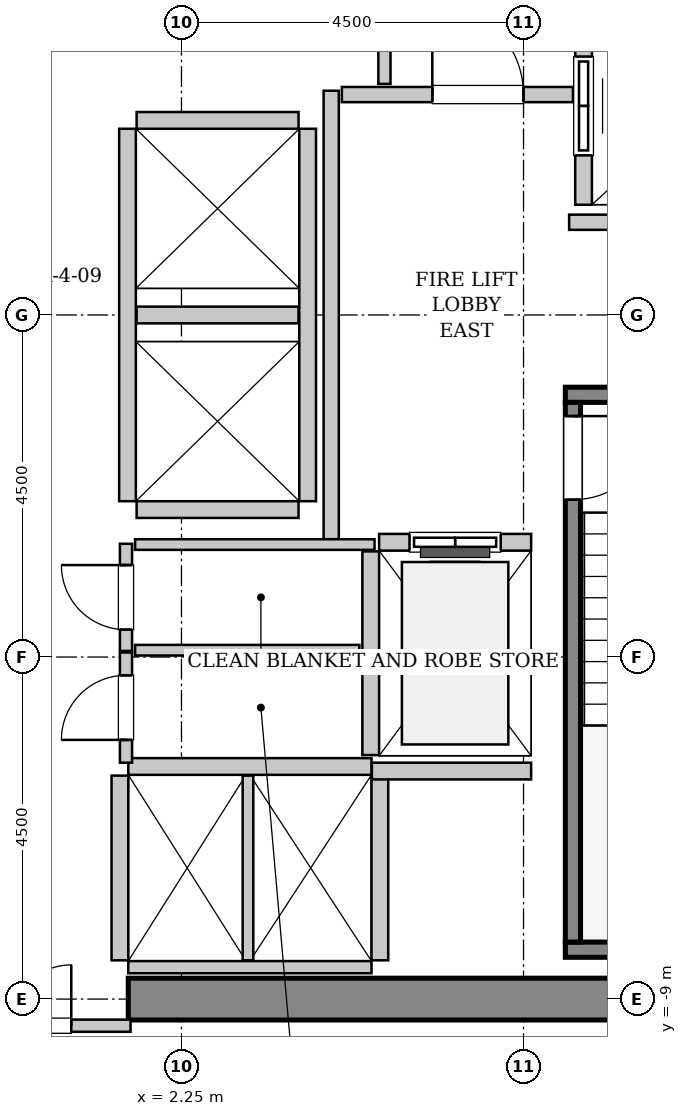
"""IFC4 building model, lengths in metres.
Left out: names, types, materials, properties, quantities, classifications, styles, units other than length and angle.
Written with IfcOpenShell. Run it as: python <this file> out.ifc"""

import sys

from ifc_helpers import new_model, si_unit, direction, frame, frame_2d, origin, place, context, subcontext, project, spatial, rectangle, extrude, source, transform, mapped, element, fill, save


model = new_model("IFC4")
c1 = context("Model", 3, precision=1e-05, world=origin(), true_north=direction((0.0, 1.0)))
c2 = subcontext(c1, "Body", "Model", "MODEL_VIEW")
j1 = project(units=[si_unit("LENGTHUNIT", "METRE"), si_unit("PLANEANGLEUNIT", "RADIAN")], contexts=[c1])
p1 = place(None, origin())
s1 = spatial("IfcSite", under=j1, at=p1, CompositionType="ELEMENT")
p2 = place(p1, origin())
s2 = spatial("IfcBuilding", under=s1, at=p2, CompositionType="ELEMENT")
p3 = place(p2, frame((0.0, 0.0, 140.2)))
s3 = spatial("IfcBuildingStorey", under=s2, at=p3, CompositionType="ELEMENT", Elevation=140.2)
m1 = source(origin(), c2, "Body", "SweptSolid", [
    extrude(rectangle(XDim=9.975, YDim=0.55, at=frame_2d((4.987, 0.0))), origin(), (0.0, 0.0, 1.0), 3.8),
])
p4 = place(p3, frame((1.55, -9.0, 0.0), z_axis=(0.0, 0.0, 1.0), x_axis=(1.0, 0.0, 0.0)))
e1 = element("IfcWall", 1, at=p4, inside=s3, PredefinedType="SHEAR", context=c2, shape_type="MappedRepresentation", body=[
    mapped(m1, transform((0.0, 0.0, 0.0), x_axis=(1.0, 0.0, 0.0), y_axis=(0.0, 1.0, 0.0), z_axis=(0.0, 0.0, 1.0), scale=1.0)),
])
m2 = source(origin(), c2, "Body", "SweptSolid", [
    extrude(rectangle(XDim=3.4, YDim=0.2, at=frame_2d((1.7, 0.0))), origin(), (0.0, 0.0, 1.0), 3.8),
])
p5 = place(p3, frame((7.3, -1.05, 0.0), z_axis=(0.0, 0.0, 1.0), x_axis=(1.0, 0.0, 0.0)))
e2 = element("IfcWall", 2, at=p5, inside=s3, PredefinedType="SOLIDWALL", context=c2, shape_type="MappedRepresentation", body=[
    mapped(m2, transform((0.0, 0.0, 0.0), x_axis=(1.0, 0.0, 0.0), y_axis=(0.0, 1.0, 0.0), z_axis=(0.0, 0.0, 1.0), scale=1.0)),
])
m3 = source(origin(), c2, "Body", "SweptSolid", [
    extrude(rectangle(XDim=3.68, YDim=0.2, at=frame_2d((1.84, 0.0))), origin(), (0.0, 0.0, 1.0), 3.8),
])
p6 = place(p3, frame((7.3, -8.35, 0.0), z_axis=(0.0, 0.0, 1.0), x_axis=(1.0, 0.0, 0.0)))
e3 = element("IfcWall", 3, at=p6, inside=s3, PredefinedType="SOLIDWALL", context=c2, shape_type="MappedRepresentation", body=[
    mapped(m3, transform((0.0, 0.0, 0.0), x_axis=(1.0, 0.0, 0.0), y_axis=(0.0, 1.0, 0.0), z_axis=(0.0, 0.0, 1.0), scale=1.0)),
])
m4 = source(origin(), c2, "Body", "SweptSolid", [
    extrude(rectangle(XDim=7.1, YDim=0.2, at=frame_2d((3.55, 0.0))), origin(), (0.0, 0.0, 1.0), 3.8),
])
p7 = place(p3, frame((7.4, -1.15, 0.0), z_axis=(0.0, 0.0, 1.0), x_axis=(0.0, -1.0, 0.0)))
e4 = element("IfcWall", 4, at=p7, inside=s3, PredefinedType="SOLIDWALL", context=c2, shape_type="MappedRepresentation", body=[
    mapped(m4, transform((0.0, 0.0, 0.0), x_axis=(1.0, 0.0, 0.0), y_axis=(0.0, 1.0, 0.0), z_axis=(0.0, 0.0, 1.0), scale=1.0)),
])
p8 = place(p7, frame((0.18, 0.0, 0.0)))
e5 = element("IfcOpeningElement", 5, at=p8, cuts=e4, PredefinedType="OPENING", context=c2, shape_type="SweptSolid", body=[
    extrude(rectangle(XDim=1.1, YDim=2.15, at=frame_2d((0.55, 1.075))), frame((0.0, 0.11, 0.0), z_axis=(0.0, -1.0, 0.0), x_axis=(1.0, 0.0, 0.0)), (0.0, 0.0, 1.0), 0.22),
])
m5 = source(origin(), c2, "Body", "SweptSolid", [
    extrude(rectangle(XDim=2.0, YDim=0.22, at=frame_2d((1.0, 0.0))), origin(), (0.0, 0.0, 1.0), 3.485),
])
p9 = place(p3, frame((6.85, -2.99, 0.0), z_axis=(0.0, 0.0, 1.0), x_axis=(-1.0, 0.0, 0.0)))
e6 = element("IfcWall", 6, at=p9, inside=s3, PredefinedType="SOLIDWALL", context=c2, shape_type="MappedRepresentation", body=[
    mapped(m5, transform((0.0, 0.0, 0.0), x_axis=(1.0, 0.0, 0.0), y_axis=(0.0, 1.0, 0.0), z_axis=(0.0, 0.0, 1.0), scale=1.0)),
])
p10 = place(p9, frame((0.4, 0.0, 0.0)))
e7 = element("IfcOpeningElement", 7, at=p10, cuts=e6, PredefinedType="OPENING", context=c2, shape_type="SweptSolid", body=[
    extrude(rectangle(XDim=1.2, YDim=2.2, at=frame_2d((0.6, 1.1))), frame((0.0, 0.12, 0.0), z_axis=(0.0, -1.0, 0.0), x_axis=(1.0, 0.0, 0.0)), (0.0, 0.0, 1.0), 0.24),
])
m6 = source(origin(), c2, "Body", "SweptSolid", [
    extrude(rectangle(XDim=2.68, YDim=0.22, at=frame_2d((1.34, 0.0))), origin(), (0.0, 0.0, 1.0), 3.485),
])
p11 = place(p3, frame((4.74, -3.11, 0.0), z_axis=(0.0, 0.0, 1.0), x_axis=(0.0, -1.0, 0.0)))
e8 = element("IfcWall", 8, at=p11, inside=s3, PredefinedType="SOLIDWALL", context=c2, shape_type="MappedRepresentation", body=[
    mapped(m6, transform((0.0, 0.0, 0.0), x_axis=(1.0, 0.0, 0.0), y_axis=(0.0, 1.0, 0.0), z_axis=(0.0, 0.0, 1.0), scale=1.0)),
])
m7 = source(origin(), c2, "Body", "SweptSolid", [
    extrude(rectangle(XDim=5.45, YDim=0.22, at=frame_2d((2.725, 0.0))), origin(), (0.0, 0.0, 1.0), 3.485),
])
p12 = place(p3, frame((7.54, 6.9, 0.0), z_axis=(0.0, 0.0, 1.0), x_axis=(0.0, -1.0, 0.0)))
e9 = element("IfcWall", 9, at=p12, inside=s3, PredefinedType="SOLIDWALL", context=c2, shape_type="MappedRepresentation", body=[
    mapped(m7, transform((0.0, 0.0, 0.0), x_axis=(1.0, 0.0, 0.0), y_axis=(0.0, 1.0, 0.0), z_axis=(0.0, 0.0, 1.0), scale=1.0)),
])
p13 = place(p12, frame((3.5, 0.0, 0.0)))
e10 = element("IfcOpeningElement", 10, at=p13, cuts=e9, PredefinedType="OPENING", context=c2, shape_type="SweptSolid", body=[
    extrude(rectangle(XDim=1.3, YDim=2.3, at=frame_2d((0.65, 1.15))), frame((0.0, 0.12, 0.0), z_axis=(0.0, -1.0, 0.0), x_axis=(1.0, 0.0, 0.0)), (0.0, 0.0, 1.0), 0.24),
])
p14 = place(p12, frame((0.65, 0.0, 0.0)))
e11 = element("IfcOpeningElement", 11, at=p14, cuts=e9, PredefinedType="OPENING", context=c2, shape_type="SweptSolid", body=[
    extrude(rectangle(XDim=1.3, YDim=2.3, at=frame_2d((0.65, 1.15))), frame((0.0, 0.12, 0.0), z_axis=(0.0, -1.0, 0.0), x_axis=(1.0, 0.0, 0.0)), (0.0, 0.0, 1.0), 0.24),
])
m8 = source(origin(), c2, "Body", "SweptSolid", [
    extrude(rectangle(XDim=3.2, YDim=0.22, at=frame_2d((1.6, 0.0))), origin(), (0.0, 0.0, 1.0), 3.485),
])
p15 = place(p3, frame((4.75, -5.94, 0.0), z_axis=(0.0, 0.0, 1.0), x_axis=(-1.0, 0.0, 0.0)))
e12 = element("IfcWall", 12, at=p15, inside=s3, PredefinedType="SOLIDWALL", context=c2, shape_type="MappedRepresentation", body=[
    mapped(m8, transform((0.0, 0.0, 0.0), x_axis=(1.0, 0.0, 0.0), y_axis=(0.0, 1.0, 0.0), z_axis=(0.0, 0.0, 1.0), scale=1.0)),
])
m9 = source(origin(), c2, "Body", "SweptSolid", [
    extrude(rectangle(XDim=3.2, YDim=0.16, at=frame_2d((1.6, 0.0))), origin(), (0.0, 0.0, 1.0), 2.375),
])
p16 = place(p3, frame((1.55, -8.58, 0.0), z_axis=(0.0, 0.0, 1.0), x_axis=(1.0, 0.0, 0.0)))
e13 = element("IfcWall", 13, at=p16, inside=s3, PredefinedType="PARTITIONING", context=c2, shape_type="MappedRepresentation", body=[
    mapped(m9, transform((0.0, 0.0, 0.0), x_axis=(1.0, 0.0, 0.0), y_axis=(0.0, 1.0, 0.0), z_axis=(0.0, 0.0, 1.0), scale=1.0)),
])
m10 = source(origin(), c2, "Body", "SweptSolid", [
    extrude(rectangle(XDim=2.43, YDim=0.22, at=frame_2d((1.215, 0.0))), origin(), (0.0, 0.0, 1.0), 3.485),
])
p17 = place(p3, frame((1.44, -6.06, 0.0), z_axis=(0.0, 0.0, 1.0), x_axis=(0.0, -1.0, 0.0)))
e14 = element("IfcWall", 14, at=p17, inside=s3, PredefinedType="SOLIDWALL", context=c2, shape_type="MappedRepresentation", body=[
    mapped(m10, transform((0.0, 0.0, 0.0), x_axis=(1.0, 0.0, 0.0), y_axis=(0.0, 1.0, 0.0), z_axis=(0.0, 0.0, 1.0), scale=1.0)),
])
m11 = source(origin(), c2, "Body", "SweptSolid", [
    extrude(rectangle(XDim=2.43, YDim=0.14, at=frame_2d((1.215, 0.0))), origin(), (0.0, 0.0, 1.0), 3.485),
])
p18 = place(p3, frame((3.125, -8.49, 0.0), z_axis=(0.0, 0.0, 1.0), x_axis=(0.0, 1.0, 0.0)))
e15 = element("IfcWall", 15, at=p18, inside=s3, PredefinedType="PARTITIONING", context=c2, shape_type="MappedRepresentation", body=[
    mapped(m11, transform((0.0, 0.0, 0.0), x_axis=(1.0, 0.0, 0.0), y_axis=(0.0, 1.0, 0.0), z_axis=(0.0, 0.0, 1.0), scale=1.0)),
])
p19 = place(p3, frame((4.86, -8.49, 0.0), z_axis=(0.0, 0.0, 1.0), x_axis=(0.0, 1.0, 0.0)))
e16 = element("IfcWall", 16, at=p19, inside=s3, PredefinedType="SOLIDWALL", context=c2, shape_type="MappedRepresentation", body=[
    mapped(m10, transform((0.0, 0.0, 0.0), x_axis=(1.0, 0.0, 0.0), y_axis=(0.0, 1.0, 0.0), z_axis=(0.0, 0.0, 1.0), scale=1.0)),
])
m12 = source(origin(), c2, "Body", "SweptSolid", [
    extrude(rectangle(XDim=4.9, YDim=0.22, at=frame_2d((2.45, 0.0))), origin(), (0.0, 0.0, 1.0), 3.485),
])
for number, where, z_axis, x_axis in (
    (17, (1.54, 2.45, 0.0), (0.0, 0.0, 1.0), (0.0, -1.0, 0.0)),
    (18, (3.91, -2.45, 0.0), (0.0, 0.0, 1.0), (0.0, 1.0, 0.0)),
):
    element("IfcWall", number, at=place(p3, frame(where, z_axis=z_axis, x_axis=x_axis)), inside=s3, PredefinedType="SOLIDWALL", context=c2, shape_type="MappedRepresentation", body=[
        mapped(m12, transform((0.0, 0.0, 0.0), x_axis=(1.0, 0.0, 0.0), y_axis=(0.0, 1.0, 0.0), z_axis=(0.0, 0.0, 1.0), scale=1.0)),
    ])
m13 = source(origin(), c2, "Body", "SweptSolid", [
    extrude(rectangle(XDim=2.13, YDim=0.22, at=frame_2d((1.065, 0.0))), origin(), (0.0, 0.0, 1.0), 3.485),
])
for number, where, z_axis, x_axis in (
    (19, (1.66, -2.56, 0.0), (0.0, 0.0, 1.0), (1.0, 0.0, 0.0)),
    (20, (1.66, 0.0, 0.0), (0.0, 0.0, 1.0), (1.0, 0.0, 0.0)),
    (21, (3.79, 2.56, 0.0), (0.0, 0.0, 1.0), (-1.0, 0.0, 0.0)),
):
    element("IfcWall", number, at=place(p3, frame(where, z_axis=z_axis, x_axis=x_axis)), inside=s3, PredefinedType="SOLIDWALL", context=c2, shape_type="MappedRepresentation", body=[
        mapped(m13, transform((0.0, 0.0, 0.0), x_axis=(1.0, 0.0, 0.0), y_axis=(0.0, 1.0, 0.0), z_axis=(0.0, 0.0, 1.0), scale=1.0)),
    ])
m14 = source(origin(), c2, "Body", "SweptSolid", [
    extrude(rectangle(XDim=2.095, YDim=0.22, at=frame_2d((1.048, 0.0))), origin(), (0.0, 0.0, 1.0), 3.485),
])
p20 = place(p3, frame((4.755, -6.0, 0.0), z_axis=(0.0, 0.0, 1.0), x_axis=(1.0, 0.0, 0.0)))
e22 = element("IfcWall", 22, at=p20, inside=s3, PredefinedType="SOLIDWALL", context=c2, shape_type="MappedRepresentation", body=[
    mapped(m14, transform((0.0, 0.0, 0.0), x_axis=(1.0, 0.0, 0.0), y_axis=(0.0, 1.0, 0.0), z_axis=(0.0, 0.0, 1.0), scale=1.0)),
])
m15 = source(origin(), c2, "Body", "SweptSolid", [
    extrude(rectangle(XDim=5.9, YDim=0.2, at=frame_2d((2.95, 0.0))), origin(), (0.0, 0.0, 1.0), 3.485),
])
p21 = place(p3, frame((4.22, -2.95, 0.0), z_axis=(0.0, 0.0, 1.0), x_axis=(0.0, 1.0, 0.0)))
e23 = element("IfcWall", 23, at=p21, inside=s3, PredefinedType="PARTITIONING", context=c2, shape_type="MappedRepresentation", body=[
    mapped(m15, transform((0.0, 0.0, 0.0), x_axis=(1.0, 0.0, 0.0), y_axis=(0.0, 1.0, 0.0), z_axis=(0.0, 0.0, 1.0), scale=1.0)),
])
m16 = source(origin(), c2, "Body", "SweptSolid", [
    extrude(rectangle(XDim=3.04, YDim=0.2, at=frame_2d((1.52, 0.0))), origin(), (0.0, 0.0, 1.0), 3.485),
])
p22 = place(p3, frame((4.36, 2.9, 0.0), z_axis=(0.0, 0.0, 1.0), x_axis=(1.0, 0.0, 0.0)))
e24 = element("IfcWall", 24, at=p22, inside=s3, PredefinedType="PARTITIONING", context=c2, shape_type="MappedRepresentation", body=[
    mapped(m16, transform((0.0, 0.0, 0.0), x_axis=(1.0, 0.0, 0.0), y_axis=(0.0, 1.0, 0.0), z_axis=(0.0, 0.0, 1.0), scale=1.0)),
])
p23 = place(p22, frame((1.19, 0.0, 0.0)))
e25 = element("IfcOpeningElement", 25, at=p23, cuts=e24, PredefinedType="OPENING", context=c2, shape_type="SweptSolid", body=[
    extrude(rectangle(XDim=1.2, YDim=2.15, at=frame_2d((0.6, 1.075))), frame((0.0, 0.11, 0.0), z_axis=(0.0, -1.0, 0.0), x_axis=(1.0, 0.0, 0.0)), (0.0, 0.0, 1.0), 0.22),
])
m17 = source(origin(), c2, "Body", "SweptSolid", [
    extrude(rectangle(XDim=4.11, YDim=0.2, at=frame_2d((2.055, 0.0))), origin(), (0.0, 0.0, 1.0), 3.485),
])
p24 = place(p3, frame((7.35, 1.22, 0.0), z_axis=(0.0, 0.0, 1.0), x_axis=(1.0, 0.0, 0.0)))
e26 = element("IfcWall", 26, at=p24, inside=s3, PredefinedType="PARTITIONING", context=c2, shape_type="MappedRepresentation", body=[
    mapped(m17, transform((0.0, 0.0, 0.0), x_axis=(1.0, 0.0, 0.0), y_axis=(0.0, 1.0, 0.0), z_axis=(0.0, 0.0, 1.0), scale=1.0)),
])
m18 = source(origin(), c2, "Body", "SweptSolid", [
    extrude(rectangle(XDim=3.16, YDim=0.16, at=frame_2d((1.58, 0.0))), origin(), (0.0, 0.0, 1.0), 2.375),
])
p25 = place(p3, frame((-1.58, -9.35, 0.0), z_axis=(0.0, 0.0, 1.0), x_axis=(1.0, 0.0, 0.0)))
e27 = element("IfcWall", 27, at=p25, inside=s3, PredefinedType="PARTITIONING", context=c2, shape_type="MappedRepresentation", body=[
    mapped(m18, transform((0.0, 0.0, 0.0), x_axis=(1.0, 0.0, 0.0), y_axis=(0.0, 1.0, 0.0), z_axis=(0.0, 0.0, 1.0), scale=1.0)),
])
p26 = place(p25, frame((0.78, 0.0, 0.0)))
e28 = element("IfcOpeningElement", 28, at=p26, cuts=e27, PredefinedType="OPENING", context=c2, shape_type="SweptSolid", body=[
    extrude(rectangle(XDim=1.6, YDim=2.3, at=frame_2d((0.8, 1.15))), frame((0.0, 0.09, 0.0), z_axis=(0.0, -1.0, 0.0), x_axis=(1.0, 0.0, 0.0)), (0.0, 0.0, 1.0), 0.18),
])
m19 = source(origin(), c2, "Body", "SweptSolid", [
    extrude(rectangle(XDim=3.015, YDim=0.16, at=frame_2d((1.507, 0.0))), origin(), (0.0, 0.0, 1.0), 3.485),
])
p27 = place(p3, frame((4.92, 3.04, 0.0), z_axis=(0.0, 0.0, 1.0), x_axis=(0.0, 1.0, 0.0)))
e29 = element("IfcWall", 29, at=p27, inside=s3, PredefinedType="PARTITIONING", context=c2, shape_type="MappedRepresentation", body=[
    mapped(m19, transform((0.0, 0.0, 0.0), x_axis=(1.0, 0.0, 0.0), y_axis=(0.0, 1.0, 0.0), z_axis=(0.0, 0.0, 1.0), scale=1.0)),
])
m20 = source(origin(), c2, "Body", "SweptSolid", [
    extrude(rectangle(XDim=1.41, YDim=0.16, at=frame_2d((0.705, 0.0))), origin(), (0.0, 0.0, 1.0), 3.485),
])
p28 = place(p3, frame((1.52, -4.42, 0.0), z_axis=(0.0, 0.0, 1.0), x_axis=(0.0, 1.0, 0.0)))
e30 = element("IfcWall", 30, at=p28, inside=s3, PredefinedType="PARTITIONING", context=c2, shape_type="MappedRepresentation", body=[
    mapped(m20, transform((0.0, 0.0, 0.0), x_axis=(1.0, 0.0, 0.0), y_axis=(0.0, 1.0, 0.0), z_axis=(0.0, 0.0, 1.0), scale=1.0)),
])
p29 = place(p28, frame((0.28, 0.0, 0.0)))
e31 = element("IfcOpeningElement", 31, at=p29, cuts=e30, PredefinedType="OPENING", context=c2, shape_type="SweptSolid", body=[
    extrude(rectangle(XDim=0.85, YDim=2.1, at=frame_2d((0.425, 1.05))), frame((0.0, 0.09, 0.0), z_axis=(0.0, -1.0, 0.0), x_axis=(1.0, 0.0, 0.0)), (0.0, 0.0, 1.0), 0.18),
])
m21 = source(origin(), c2, "Body", "SweptSolid", [
    extrude(rectangle(XDim=3.15, YDim=0.14, at=frame_2d((1.575, 0.0))), origin(), (0.0, 0.0, 1.0), 3.485),
])
p30 = place(p3, frame((1.64, -3.02, 0.0), z_axis=(0.0, 0.0, 1.0), x_axis=(1.0, 0.0, 0.0)))
e32 = element("IfcWall", 32, at=p30, inside=s3, PredefinedType="PARTITIONING", context=c2, shape_type="MappedRepresentation", body=[
    mapped(m21, transform((0.0, 0.0, 0.0), x_axis=(1.0, 0.0, 0.0), y_axis=(0.0, 1.0, 0.0), z_axis=(0.0, 0.0, 1.0), scale=1.0)),
])
m22 = source(origin(), c2, "Body", "SweptSolid", [
    extrude(rectangle(XDim=2.95, YDim=0.14, at=frame_2d((1.475, 0.0))), origin(), (0.0, 0.0, 1.0), 3.485),
])
p31 = place(p3, frame((1.64, -4.41, 0.0), z_axis=(0.0, 0.0, 1.0), x_axis=(1.0, 0.0, 0.0)))
e33 = element("IfcWall", 33, at=p31, inside=s3, PredefinedType="PARTITIONING", context=c2, shape_type="MappedRepresentation", body=[
    mapped(m22, transform((0.0, 0.0, 0.0), x_axis=(1.0, 0.0, 0.0), y_axis=(0.0, 1.0, 0.0), z_axis=(0.0, 0.0, 1.0), scale=1.0)),
])
m23 = source(origin(), c2, "Body", "SweptSolid", [
    extrude(rectangle(XDim=1.45, YDim=0.16, at=frame_2d((0.725, 0.0))), origin(), (0.0, 0.0, 1.0), 3.485),
])
p32 = place(p3, frame((1.52, -5.89, 0.0), z_axis=(0.0, 0.0, 1.0), x_axis=(0.0, 1.0, 0.0)))
e34 = element("IfcWall", 34, at=p32, inside=s3, PredefinedType="PARTITIONING", context=c2, shape_type="MappedRepresentation", body=[
    mapped(m23, transform((0.0, 0.0, 0.0), x_axis=(1.0, 0.0, 0.0), y_axis=(0.0, 1.0, 0.0), z_axis=(0.0, 0.0, 1.0), scale=1.0)),
])
p33 = place(p32, frame((0.3, 0.0, 0.0)))
e35 = element("IfcOpeningElement", 35, at=p33, cuts=e34, PredefinedType="OPENING", context=c2, shape_type="SweptSolid", body=[
    extrude(rectangle(XDim=0.85, YDim=2.1, at=frame_2d((0.425, 1.05))), frame((0.0, 0.09, 0.0), z_axis=(0.0, -1.0, 0.0), x_axis=(1.0, 0.0, 0.0)), (0.0, 0.0, 1.0), 0.18),
])
m24 = source(origin(), c2, "Body", "SweptSolid", [
    extrude(rectangle(XDim=1.1, YDim=2.15, at=frame_2d((0.55, 1.075))), frame((0.0, 0.025, 0.0), z_axis=(0.0, -1.0, 0.0), x_axis=(1.0, 0.0, 0.0)), (0.0, 0.0, 1.0), 0.05),
])
p34 = place(p8, origin())
e36 = element("IfcDoor", 36, at=p34, inside=s3, OperationType="SINGLE_SWING_LEFT", PredefinedType="DOOR", context=c2, shape_type="MappedRepresentation", body=[
    mapped(m24, transform((0.0, 0.0, 0.0), x_axis=(1.0, 0.0, 0.0), y_axis=(0.0, 1.0, 0.0), z_axis=(0.0, 0.0, 1.0), scale=1.0)),
])
fill(e5, e36)
m25 = source(origin(), c2, "Body", "SweptSolid", [
    extrude(rectangle(XDim=1.2, YDim=2.2, at=frame_2d((0.6, 1.1))), frame((0.0, 0.025, 0.0), z_axis=(0.0, -1.0, 0.0), x_axis=(1.0, 0.0, 0.0)), (0.0, 0.0, 1.0), 0.05),
])
p35 = place(p10, origin())
e37 = element("IfcDoor", 37, at=p35, inside=s3, OperationType="SLIDING_TO_LEFT", PredefinedType="DOOR", context=c2, shape_type="MappedRepresentation", body=[
    mapped(m25, transform((0.0, 0.0, 0.0), x_axis=(1.0, 0.0, 0.0), y_axis=(0.0, 1.0, 0.0), z_axis=(0.0, 0.0, 1.0), scale=1.0)),
])
fill(e7, e37)
m26 = source(origin(), c2, "Body", "SweptSolid", [
    extrude(rectangle(XDim=1.3, YDim=2.3, at=frame_2d((0.65, 1.15))), frame((0.0, 0.025, 0.0), z_axis=(0.0, -1.0, 0.0), x_axis=(1.0, 0.0, 0.0)), (0.0, 0.0, 1.0), 0.05),
])
p36 = place(p13, origin())
e38 = element("IfcDoor", 38, at=p36, inside=s3, OperationType="SLIDING_TO_RIGHT", PredefinedType="DOOR", context=c2, shape_type="MappedRepresentation", body=[
    mapped(m26, transform((0.0, 0.0, 0.0), x_axis=(1.0, 0.0, 0.0), y_axis=(0.0, 1.0, 0.0), z_axis=(0.0, 0.0, 1.0), scale=1.0)),
])
fill(e10, e38)
m27 = source(origin(), c2, "Body", "SweptSolid", [
    extrude(rectangle(XDim=1.2, YDim=2.15, at=frame_2d((0.6, 1.075))), frame((0.0, 0.025, 0.0), z_axis=(0.0, -1.0, 0.0), x_axis=(1.0, 0.0, 0.0)), (0.0, 0.0, 1.0), 0.05),
])
p37 = place(p23, origin())
e39 = element("IfcDoor", 39, at=p37, inside=s3, OperationType="SINGLE_SWING_LEFT", PredefinedType="DOOR", context=c2, shape_type="MappedRepresentation", body=[
    mapped(m27, transform((0.0, 0.0, 0.0), x_axis=(1.0, 0.0, 0.0), y_axis=(0.0, 1.0, 0.0), z_axis=(0.0, 0.0, 1.0), scale=1.0)),
])
fill(e25, e39)
m28 = source(origin(), c2, "Body", "SweptSolid", [
    extrude(rectangle(XDim=1.6, YDim=2.3, at=frame_2d((0.8, 1.15))), frame((0.0, 0.025, 0.0), z_axis=(0.0, -1.0, 0.0), x_axis=(1.0, 0.0, 0.0)), (0.0, 0.0, 1.0), 0.05),
])
p38 = place(p26, origin())
e40 = element("IfcDoor", 40, at=p38, inside=s3, OperationType="DOUBLE_DOOR_SINGLE_SWING", PredefinedType="DOOR", context=c2, shape_type="MappedRepresentation", body=[
    mapped(m28, transform((0.0, 0.0, 0.0), x_axis=(1.0, 0.0, 0.0), y_axis=(0.0, 1.0, 0.0), z_axis=(0.0, 0.0, 1.0), scale=1.0)),
])
fill(e28, e40)
m29 = source(origin(), c2, "Body", "SweptSolid", [
    extrude(rectangle(XDim=0.85, YDim=2.1, at=frame_2d((0.425, 1.05))), frame((0.0, 0.025, 0.0), z_axis=(0.0, -1.0, 0.0), x_axis=(1.0, 0.0, 0.0)), (0.0, 0.0, 1.0), 0.05),
])
p39 = place(p29, origin())
e41 = element("IfcDoor", 41, at=p39, inside=s3, OperationType="SINGLE_SWING_RIGHT", PredefinedType="DOOR", context=c2, shape_type="MappedRepresentation", body=[
    mapped(m29, transform((0.0, 0.0, 0.0), x_axis=(1.0, 0.0, 0.0), y_axis=(0.0, 1.0, 0.0), z_axis=(0.0, 0.0, 1.0), scale=1.0)),
])
fill(e31, e41)
p40 = place(p33, origin())
e42 = element("IfcDoor", 42, at=p40, inside=s3, OperationType="SINGLE_SWING_LEFT", PredefinedType="DOOR", context=c2, shape_type="MappedRepresentation", body=[
    mapped(m29, transform((0.0, 0.0, 0.0), x_axis=(1.0, 0.0, 0.0), y_axis=(0.0, 1.0, 0.0), z_axis=(0.0, 0.0, 1.0), scale=1.0)),
])
fill(e35, e42)
save(model, sys.argv[1])
